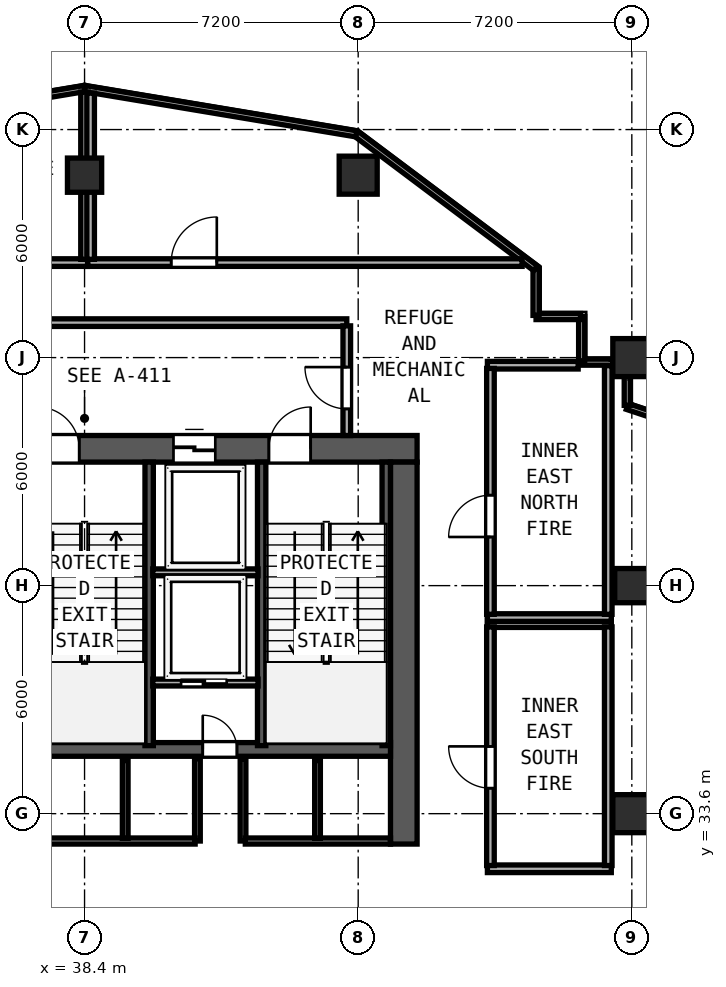
"""IFC4 building model, lengths in metres.
Left out: names, types, materials, properties, quantities, classifications, styles, units other than length and angle.
Written with IfcOpenShell. Run it as: python <this file> out.ifc"""

import sys

from ifc_helpers import new_model, si_unit, direction, frame, frame_2d, origin, origin_2d, place, context, subcontext, project, spatial, rectangle, hollow_rectangle, extrude, element, fill, save


model = new_model("IFC4")
c1 = context("Model", 3, precision=1e-05, world=origin(), true_north=direction((0.0, 1.0)))
c2 = subcontext(c1, "Body", "Model", "MODEL_VIEW")
j1 = project(units=[si_unit("LENGTHUNIT", "METRE"), si_unit("PLANEANGLEUNIT", "RADIAN")], contexts=[c1])
p1 = place(None, origin())
s1 = spatial("IfcSite", under=j1, at=p1, CompositionType="ELEMENT")
p2 = place(p1, origin())
s2 = spatial("IfcBuilding", under=s1, at=p2, CompositionType="ELEMENT")
p3 = place(p2, frame((0.0, 0.0, 136.4)))
s3 = spatial("IfcBuildingStorey", under=s2, at=p3, CompositionType="ELEMENT", Elevation=136.4)
p4 = place(p3, frame((29.65, 43.2, 0.0), z_axis=(0.0, 0.0, 1.0), x_axis=(1.0, 0.0, 0.0)))
e1 = element("IfcWall", 1, at=p4, inside=s3, PredefinedType="SHEAR", context=c2, shape_type="SweptSolid", body=[
    extrude(rectangle(XDim=17.5, YDim=0.7, at=frame_2d((8.75, 0.0))), origin(), (0.0, 0.0, 1.0), 4.4),
])
p5 = place(p4, frame((2.4, 0.0, 0.0)))
e2 = element("IfcOpeningElement", 2, at=p5, cuts=e1, PredefinedType="OPENING", context=c2, shape_type="SweptSolid", body=[
    extrude(rectangle(XDim=1.1, YDim=2.15, at=frame_2d((0.55, 1.075))), frame((0.0, 0.36, 0.0), z_axis=(0.0, -1.0, 0.0), x_axis=(1.0, 0.0, 0.0)), (0.0, 0.0, 1.0), 0.72),
])
p6 = place(p4, frame((7.51, 0.0, 0.0)))
e3 = element("IfcOpeningElement", 3, at=p6, cuts=e1, PredefinedType="OPENING", context=c2, shape_type="SweptSolid", body=[
    extrude(rectangle(XDim=1.1, YDim=2.15, at=frame_2d((0.55, 1.075))), frame((0.0, 0.36, 0.0), z_axis=(0.0, -1.0, 0.0), x_axis=(1.0, 0.0, 0.0)), (0.0, 0.0, 1.0), 0.72),
])
p7 = place(p4, frame((13.6, 0.0, 0.0)))
e4 = element("IfcOpeningElement", 4, at=p7, cuts=e1, PredefinedType="OPENING", context=c2, shape_type="SweptSolid", body=[
    extrude(rectangle(XDim=1.1, YDim=2.15, at=frame_2d((0.55, 1.075))), frame((0.0, 0.36, 0.0), z_axis=(0.0, -1.0, 0.0), x_axis=(1.0, 0.0, 0.0)), (0.0, 0.0, 1.0), 0.72),
])
p8 = place(p4, frame((4.73, 0.0, 0.0)))
e5 = element("IfcOpeningElement", 5, at=p8, cuts=e1, PredefinedType="OPENING", context=c2, shape_type="SweptSolid", body=[
    extrude(rectangle(XDim=1.1, YDim=2.2, at=frame_2d((0.55, 1.1))), frame((0.0, 0.36, 0.0), z_axis=(0.0, -1.0, 0.0), x_axis=(1.0, 0.0, 0.0)), (0.0, 0.0, 1.0), 0.72),
])
p9 = place(p4, frame((11.09, 0.0, 0.0)))
e6 = element("IfcOpeningElement", 6, at=p9, cuts=e1, PredefinedType="OPENING", context=c2, shape_type="SweptSolid", body=[
    extrude(rectangle(XDim=1.1, YDim=2.2, at=frame_2d((0.55, 1.1))), frame((0.0, 0.36, 0.0), z_axis=(0.0, -1.0, 0.0), x_axis=(1.0, 0.0, 0.0)), (0.0, 0.0, 1.0), 0.72),
])
p10 = place(p3, frame((46.8, 32.8, 0.0), z_axis=(0.0, 0.0, 1.0), x_axis=(0.0, 1.0, 0.0)))
e7 = element("IfcWall", 7, at=p10, inside=s3, PredefinedType="SHEAR", context=c2, shape_type="SweptSolid", body=[
    extrude(rectangle(XDim=10.05, YDim=0.7, at=frame_2d((5.025, 0.0))), origin(), (0.0, 0.0, 1.0), 4.4),
])
p11 = place(p3, frame((30.35, 35.29, 0.0), z_axis=(0.0, 0.0, 1.0), x_axis=(1.0, 0.0, 0.0)))
e8 = element("IfcWall", 8, at=p11, inside=s3, PredefinedType="SHEAR", context=c2, shape_type="SweptSolid", body=[
    extrude(rectangle(XDim=16.1, YDim=0.36, at=frame_2d((8.05, 0.0))), origin(), (0.0, 0.0, 1.0), 4.4),
])
p12 = place(p11, frame((5.0, 0.0, 0.0), z_axis=(0.0, 0.0, 1.0), x_axis=(-1.0, 0.0, 0.0)))
e9 = element("IfcOpeningElement", 9, at=p12, cuts=e8, PredefinedType="OPENING", context=c2, shape_type="SweptSolid", body=[
    extrude(rectangle(XDim=0.9, YDim=2.1, at=frame_2d((0.45, 1.05))), frame((0.0, 0.19, 0.0), z_axis=(0.0, -1.0, 0.0), x_axis=(1.0, 0.0, 0.0)), (0.0, 0.0, 1.0), 0.38),
])
p13 = place(p11, frame((12.06, 0.0, 0.0), z_axis=(0.0, 0.0, 1.0), x_axis=(-1.0, 0.0, 0.0)))
e10 = element("IfcOpeningElement", 10, at=p13, cuts=e8, PredefinedType="OPENING", context=c2, shape_type="SweptSolid", body=[
    extrude(rectangle(XDim=0.9, YDim=2.1, at=frame_2d((0.45, 1.05))), frame((0.0, 0.19, 0.0), z_axis=(0.0, -1.0, 0.0), x_axis=(1.0, 0.0, 0.0)), (0.0, 0.0, 1.0), 0.38),
])
for number, where, z_axis, x_axis in (
    (11, (40.1, 35.39, 0.0), (0.0, 0.0, 1.0), (0.0, 1.0, 0.0)),
    (12, (43.06, 35.39, 0.0), (0.0, 0.0, 1.0), (0.0, 1.0, 0.0)),
    (13, (46.338, 35.39, 0.0), (0.0, 0.0, 1.0), (0.0, 1.0, 0.0)),
):
    element("IfcWall", number, at=place(p3, frame(where, z_axis=z_axis, x_axis=x_axis)), inside=s3, PredefinedType="SHEAR", context=c2, shape_type="SweptSolid", body=[
        extrude(rectangle(XDim=7.46, YDim=0.22, at=frame_2d((3.73, 0.0))), origin(), (0.0, 0.0, 1.0), 4.4),
    ])
for number, where, z_axis, x_axis in (
    (14, (52.8, 33.6, 0.0), (0.0, 0.0, 1.0), (1.0, 0.0, 0.0)),
    (15, (52.8, 45.6, 0.0), (0.0, 0.0, 1.0), (1.0, 0.0, 0.0)),
    (16, (45.6, 50.4, 0.0), (0.0, 0.0, 1.0), (1.0, 0.0, 0.0)),
):
    element("IfcColumn", number, at=place(p3, frame(where, z_axis=z_axis, x_axis=x_axis)), inside=s3, PredefinedType="COLUMN", context=c2, shape_type="SweptSolid", body=[
        extrude(hollow_rectangle(XDim=1.0, YDim=1.0, WallThickness=0.038, at=origin_2d()), origin(), (0.0, 0.0, 1.0), 4.6),
    ])
for number, where, z_axis, x_axis in (
    (17, (52.8, 39.6, 0.0), (0.0, 0.0, 1.0), (1.0, 0.0, 0.0)),
    (18, (38.4, 50.4, 0.0), (0.0, 0.0, 1.0), (1.0, 0.0, 0.0)),
):
    element("IfcColumn", number, at=place(p3, frame(where, z_axis=z_axis, x_axis=x_axis)), inside=s3, PredefinedType="COLUMN", context=c2, shape_type="SweptSolid", body=[
        extrude(hollow_rectangle(XDim=0.9, YDim=0.9, WallThickness=0.034, at=origin_2d()), origin(), (0.0, 0.0, 1.0), 4.6),
    ])
p14 = place(p3, frame((58.295, 42.442, 0.0), z_axis=(0.0, 0.0, 1.0), x_axis=(-0.948683298051, 0.316227766017, 0.0)))
e19 = element("IfcWall", 19, at=p14, inside=s3, PredefinedType="PARAPET", context=c2, shape_type="SweptSolid", body=[
    extrude(rectangle(XDim=5.918, YDim=0.16, at=frame_2d((2.959, 0.0))), origin(), (0.0, 0.0, 1.0), 1.15),
])
p15 = place(p3, frame((52.68, 44.344, 0.0), z_axis=(0.0, 0.0, 1.0), x_axis=(0.0, 1.0, 0.0)))
e20 = element("IfcWall", 20, at=p15, inside=s3, PredefinedType="PARAPET", context=c2, shape_type="SweptSolid", body=[
    extrude(rectangle(XDim=0.764, YDim=0.16, at=frame_2d((0.382, 0.0))), origin(), (0.0, 0.0, 1.0), 1.15),
])
p16 = place(p3, frame((52.308, 45.48, 0.0), z_axis=(0.0, 0.0, 1.0), x_axis=(-1.0, 0.0, 0.0)))
e21 = element("IfcWall", 21, at=p16, inside=s3, PredefinedType="PARAPET", context=c2, shape_type="SweptSolid", body=[
    extrude(rectangle(XDim=0.828, YDim=0.16, at=frame_2d((0.414, 0.0))), origin(), (0.0, 0.0, 1.0), 1.15),
])
for number, where, z_axis, x_axis in (
    (22, (51.48, 45.51, 0.0), (0.0, 0.0, 1.0), (0.0, 1.0, 0.0)),
    (23, (51.45, 46.68, 0.0), (0.0, 0.0, 1.0), (-1.0, 0.0, 0.0)),
):
    element("IfcWall", number, at=place(p3, frame(where, z_axis=z_axis, x_axis=x_axis)), inside=s3, PredefinedType="PARAPET", context=c2, shape_type="SweptSolid", body=[
        extrude(rectangle(XDim=1.17, YDim=0.16, at=frame_2d((0.585, 0.0))), origin(), (0.0, 0.0, 1.0), 1.15),
    ])
p17 = place(p3, frame((50.28, 46.71, 0.0), z_axis=(0.0, 0.0, 1.0), x_axis=(0.0, 1.0, 0.0)))
e24 = element("IfcWall", 24, at=p17, inside=s3, PredefinedType="PARAPET", context=c2, shape_type="SweptSolid", body=[
    extrude(rectangle(XDim=1.23, YDim=0.16, at=frame_2d((0.615, 0.0))), origin(), (0.0, 0.0, 1.0), 1.15),
])
p18 = place(p3, frame((50.268, 47.949, 0.0), z_axis=(0.0, 0.0, 1.0), x_axis=(-0.800004969205, 0.599993374337, 0.0)))
e25 = element("IfcWall", 25, at=p18, inside=s3, PredefinedType="PARAPET", context=c2, shape_type="SweptSolid", body=[
    extrude(rectangle(XDim=5.896, YDim=0.16, at=frame_2d((2.948, 0.0))), origin(), (0.0, 0.0, 1.0), 1.15),
])
p19 = place(p3, frame((45.552, 51.486, 0.0), z_axis=(0.0, 0.0, 1.0), x_axis=(-0.986394833909, 0.164393526752, 0.0)))
e26 = element("IfcWall", 26, at=p19, inside=s3, PredefinedType="PARAPET", context=c2, shape_type="SweptSolid", body=[
    extrude(rectangle(XDim=7.25, YDim=0.16, at=frame_2d((3.625, 0.0))), origin(), (0.0, 0.0, 1.0), 1.15),
])
p20 = place(p3, frame((38.4, 52.678, 0.0), z_axis=(0.0, 0.0, 1.0), x_axis=(-0.986393923832, -0.164398987305, 0.0)))
e27 = element("IfcWall", 27, at=p20, inside=s3, PredefinedType="PARAPET", context=c2, shape_type="SweptSolid", body=[
    extrude(rectangle(XDim=7.25, YDim=0.16, at=frame_2d((3.625, 0.0))), origin(), (0.0, 0.0, 1.0), 1.15),
])
p21 = place(p3, frame((31.5, 46.52, 0.0), z_axis=(0.0, 0.0, 1.0), x_axis=(1.0, 0.0, 0.0)))
e28 = element("IfcWall", 28, at=p21, inside=s3, PredefinedType="SOLIDWALL", context=c2, shape_type="SweptSolid", body=[
    extrude(rectangle(XDim=13.8, YDim=0.2, at=frame_2d((6.9, 0.0))), origin(), (0.0, 0.0, 1.0), 4.4),
])
p22 = place(p3, frame((45.3, 43.55, 0.0), z_axis=(0.0, 0.0, 1.0), x_axis=(0.0, 1.0, 0.0)))
e29 = element("IfcWall", 29, at=p22, inside=s3, PredefinedType="SOLIDWALL", context=c2, shape_type="SweptSolid", body=[
    extrude(rectangle(XDim=2.885, YDim=0.2, at=frame_2d((1.442, 0.0))), origin(), (0.0, 0.0, 1.0), 4.4),
])
p23 = place(p22, frame((0.7, 0.0, 0.0)))
e30 = element("IfcOpeningElement", 30, at=p23, cuts=e29, PredefinedType="OPENING", context=c2, shape_type="SweptSolid", body=[
    extrude(rectangle(XDim=1.1, YDim=2.15, at=frame_2d((0.55, 1.075))), frame((0.0, 0.11, 0.0), z_axis=(0.0, -1.0, 0.0), x_axis=(1.0, 0.0, 0.0)), (0.0, 0.0, 1.0), 0.22),
])
p24 = place(p3, frame((40.195, 39.95, 0.0), z_axis=(0.0, 0.0, 1.0), x_axis=(1.0, 0.0, 0.0)))
e31 = element("IfcWall", 31, at=p24, inside=s3, PredefinedType="SOLIDWALL", context=c2, shape_type="SweptSolid", body=[
    extrude(rectangle(XDim=2.77, YDim=0.18, at=frame_2d((1.385, 0.0))), origin(), (0.0, 0.0, 1.0), 4.4),
])
p25 = place(p3, frame((40.195, 37.05, 0.0), z_axis=(0.0, 0.0, 1.0), x_axis=(1.0, 0.0, 0.0)))
e32 = element("IfcWall", 32, at=p25, inside=s3, PredefinedType="SOLIDWALL", context=c2, shape_type="SweptSolid", body=[
    extrude(rectangle(XDim=2.77, YDim=0.18, at=frame_2d((1.385, 0.0))), origin(), (0.0, 0.0, 1.0), 4.4),
])
p26 = place(p25, frame((1.945, 0.0, 0.0), z_axis=(0.0, 0.0, 1.0), x_axis=(-1.0, 0.0, 0.0)))
e33 = element("IfcOpeningElement", 33, at=p26, cuts=e32, PredefinedType="OPENING", context=c2, shape_type="SweptSolid", body=[
    extrude(rectangle(XDim=1.2, YDim=2.2, at=frame_2d((0.6, 1.1))), frame((0.0, 0.1, 0.0), z_axis=(0.0, -1.0, 0.0), x_axis=(1.0, 0.0, 0.0)), (0.0, 0.0, 1.0), 0.2),
])
for number, where, z_axis, x_axis in (
    (34, (41.37, 32.88, 0.0), (0.0, 0.0, 1.0), (0.0, 1.0, 0.0)),
    (35, (42.57, 32.88, 0.0), (0.0, 0.0, 1.0), (0.0, 1.0, 0.0)),
):
    element("IfcWall", number, at=place(p3, frame(where, z_axis=z_axis, x_axis=x_axis)), inside=s3, PredefinedType="SOLIDWALL", context=c2, shape_type="SweptSolid", body=[
        extrude(rectangle(XDim=2.17, YDim=0.15, at=frame_2d((1.085, 0.0))), origin(), (0.0, 0.0, 1.0), 4.4),
    ])
p27 = place(p3, frame((35.57, 32.88, 0.0), z_axis=(0.0, 0.0, 1.0), x_axis=(1.0, 0.0, 0.0)))
e36 = element("IfcWall", 36, at=p27, inside=s3, PredefinedType="SOLIDWALL", context=c2, shape_type="SweptSolid", body=[
    extrude(rectangle(XDim=5.74, YDim=0.16, at=frame_2d((2.87, 0.0))), origin(), (0.0, 0.0, 1.0), 4.4),
])
p28 = place(p27, frame((1.49, 0.0, 0.0), z_axis=(0.0, 0.0, 1.0), x_axis=(-1.0, 0.0, 0.0)))
e37 = element("IfcOpeningElement", 37, at=p28, cuts=e36, PredefinedType="OPENING", context=c2, shape_type="SweptSolid", body=[
    extrude(rectangle(XDim=0.95, YDim=2.12, at=frame_2d((0.475, 1.06))), frame((0.0, 0.09, 0.0), z_axis=(0.0, -1.0, 0.0), x_axis=(1.0, 0.0, 0.0)), (0.0, 0.0, 1.0), 0.18),
])
p29 = place(p3, frame((42.63, 32.88, 0.0), z_axis=(0.0, 0.0, 1.0), x_axis=(1.0, 0.0, 0.0)))
e38 = element("IfcWall", 38, at=p29, inside=s3, PredefinedType="SOLIDWALL", context=c2, shape_type="SweptSolid", body=[
    extrude(rectangle(XDim=3.82, YDim=0.16, at=frame_2d((1.91, 0.0))), origin(), (0.0, 0.0, 1.0), 4.4),
])
for number, where, z_axis, x_axis in (
    (39, (39.47, 32.95, 0.0), (0.0, 0.0, 1.0), (0.0, 1.0, 0.0)),
    (40, (44.53, 32.95, 0.0), (0.0, 0.0, 1.0), (0.0, 1.0, 0.0)),
):
    element("IfcWall", number, at=place(p3, frame(where, z_axis=z_axis, x_axis=x_axis)), inside=s3, PredefinedType="SOLIDWALL", context=c2, shape_type="SweptSolid", body=[
        extrude(rectangle(XDim=2.05, YDim=0.15, at=frame_2d((1.025, 0.0))), origin(), (0.0, 0.0, 1.0), 4.4),
    ])
for number, where, z_axis, x_axis in (
    (41, (49.0, 38.6, 0.0), (0.0, 0.0, 1.0), (1.0, 0.0, 0.0)),
    (42, (49.0, 32.15, 0.0), (0.0, 0.0, 1.0), (1.0, 0.0, 0.0)),
):
    element("IfcWall", number, at=place(p3, frame(where, z_axis=z_axis, x_axis=x_axis)), inside=s3, PredefinedType="SOLIDWALL", context=c2, shape_type="SweptSolid", body=[
        extrude(rectangle(XDim=3.26, YDim=0.2, at=frame_2d((1.63, 0.0))), origin(), (0.0, 0.0, 1.0), 4.4),
    ])
p30 = place(p3, frame((49.08, 32.235, 0.0), z_axis=(0.0, 0.0, 1.0), x_axis=(0.0, 1.0, 0.0)))
e43 = element("IfcWall", 43, at=p30, inside=s3, PredefinedType="SOLIDWALL", context=c2, shape_type="SweptSolid", body=[
    extrude(rectangle(XDim=6.28, YDim=0.2, at=frame_2d((3.14, 0.0))), origin(), (0.0, 0.0, 1.0), 4.4),
])
p31 = place(p30, frame((2.035, 0.0, 0.0)))
e44 = element("IfcOpeningElement", 44, at=p31, cuts=e43, PredefinedType="OPENING", context=c2, shape_type="SweptSolid", body=[
    extrude(rectangle(XDim=1.1, YDim=2.15, at=frame_2d((0.55, 1.075))), frame((0.0, 0.11, 0.0), z_axis=(0.0, -1.0, 0.0), x_axis=(1.0, 0.0, 0.0)), (0.0, 0.0, 1.0), 0.22),
])
p32 = place(p3, frame((52.18, 32.235, 0.0), z_axis=(0.0, 0.0, 1.0), x_axis=(0.0, 1.0, 0.0)))
e45 = element("IfcWall", 45, at=p32, inside=s3, PredefinedType="SOLIDWALL", context=c2, shape_type="SweptSolid", body=[
    extrude(rectangle(XDim=6.28, YDim=0.2, at=frame_2d((3.14, 0.0))), origin(), (0.0, 0.0, 1.0), 4.4),
])
p33 = place(p3, frame((49.0, 45.4, 0.0), z_axis=(0.0, 0.0, 1.0), x_axis=(1.0, 0.0, 0.0)))
e46 = element("IfcWall", 46, at=p33, inside=s3, PredefinedType="SOLIDWALL", context=c2, shape_type="SweptSolid", body=[
    extrude(rectangle(XDim=2.388, YDim=0.2, at=frame_2d((1.194, 0.0))), origin(), (0.0, 0.0, 1.0), 4.4),
])
p34 = place(p3, frame((49.0, 38.76, 0.0), z_axis=(0.0, 0.0, 1.0), x_axis=(1.0, 0.0, 0.0)))
e47 = element("IfcWall", 47, at=p34, inside=s3, PredefinedType="SOLIDWALL", context=c2, shape_type="SweptSolid", body=[
    extrude(rectangle(XDim=3.26, YDim=0.2, at=frame_2d((1.63, 0.0))), origin(), (0.0, 0.0, 1.0), 4.4),
])
p35 = place(p3, frame((49.08, 38.845, 0.0), z_axis=(0.0, 0.0, 1.0), x_axis=(0.0, 1.0, 0.0)))
e48 = element("IfcWall", 48, at=p35, inside=s3, PredefinedType="SOLIDWALL", context=c2, shape_type="SweptSolid", body=[
    extrude(rectangle(XDim=6.47, YDim=0.2, at=frame_2d((3.235, 0.0))), origin(), (0.0, 0.0, 1.0), 4.4),
])
p36 = place(p35, frame((2.035, 0.0, 0.0)))
e49 = element("IfcOpeningElement", 49, at=p36, cuts=e48, PredefinedType="OPENING", context=c2, shape_type="SweptSolid", body=[
    extrude(rectangle(XDim=1.1, YDim=2.15, at=frame_2d((0.55, 1.075))), frame((0.0, 0.11, 0.0), z_axis=(0.0, -1.0, 0.0), x_axis=(1.0, 0.0, 0.0)), (0.0, 0.0, 1.0), 0.22),
])
p37 = place(p3, frame((52.18, 38.845, 0.0), z_axis=(0.0, 0.0, 1.0), x_axis=(0.0, 1.0, 0.0)))
e50 = element("IfcWall", 50, at=p37, inside=s3, PredefinedType="SOLIDWALL", context=c2, shape_type="SweptSolid", body=[
    extrude(rectangle(XDim=6.543, YDim=0.2, at=frame_2d((3.271, 0.0))), origin(), (0.0, 0.0, 1.0), 4.4),
])
p38 = place(p3, frame((26.887, 48.1, 0.0), z_axis=(0.0, 0.0, 1.0), x_axis=(1.0, 0.0, 0.0)))
e51 = element("IfcWall", 51, at=p38, inside=s3, PredefinedType="SOLIDWALL", context=c2, shape_type="SweptSolid", body=[
    extrude(rectangle(XDim=11.593, YDim=0.2, at=frame_2d((5.797, 0.0))), origin(), (0.0, 0.0, 1.0), 4.4),
])
p39 = place(p38, frame((4.063, 0.0, 0.0)))
e52 = element("IfcOpeningElement", 52, at=p39, cuts=e51, PredefinedType="OPENING", context=c2, shape_type="SweptSolid", body=[
    extrude(rectangle(XDim=1.2, YDim=2.15, at=frame_2d((0.6, 1.075))), frame((0.0, 0.11, 0.0), z_axis=(0.0, -1.0, 0.0), x_axis=(1.0, 0.0, 0.0)), (0.0, 0.0, 1.0), 0.22),
])
p40 = place(p3, frame((38.4, 48.185, 0.0), z_axis=(0.0, 0.0, 1.0), x_axis=(0.0, 1.0, 0.0)))
e53 = element("IfcWall", 53, at=p40, inside=s3, PredefinedType="SOLIDWALL", context=c2, shape_type="SweptSolid", body=[
    extrude(rectangle(XDim=4.4, YDim=0.2, at=frame_2d((2.2, 0.0))), origin(), (0.0, 0.0, 1.0), 4.4),
])
p41 = place(p3, frame((38.485, 48.1, 0.0), z_axis=(0.0, 0.0, 1.0), x_axis=(1.0, 0.0, 0.0)))
e54 = element("IfcWall", 54, at=p41, inside=s3, PredefinedType="SOLIDWALL", context=c2, shape_type="SweptSolid", body=[
    extrude(rectangle(XDim=11.428, YDim=0.2, at=frame_2d((5.714, 0.0))), origin(), (0.0, 0.0, 1.0), 4.4),
])
p42 = place(p41, frame((2.195, 0.0, 0.0)))
e55 = element("IfcOpeningElement", 55, at=p42, cuts=e54, PredefinedType="OPENING", context=c2, shape_type="SweptSolid", body=[
    extrude(rectangle(XDim=1.2, YDim=2.15, at=frame_2d((0.6, 1.075))), frame((0.0, 0.11, 0.0), z_axis=(0.0, -1.0, 0.0), x_axis=(1.0, 0.0, 0.0)), (0.0, 0.0, 1.0), 0.22),
])
p43 = place(p3, frame((38.56, 48.185, 0.0), z_axis=(0.0, 0.0, 1.0), x_axis=(0.0, 1.0, 0.0)))
e56 = element("IfcWall", 56, at=p43, inside=s3, PredefinedType="SOLIDWALL", context=c2, shape_type="SweptSolid", body=[
    extrude(rectangle(XDim=4.373, YDim=0.2, at=frame_2d((2.187, 0.0))), origin(), (0.0, 0.0, 1.0), 4.4),
])
p44 = place(p6, origin())
e57 = element("IfcDoor", 57, at=p44, inside=s3, OperationType="SINGLE_SWING_LEFT", PredefinedType="DOOR", context=c2, shape_type="SweptSolid", body=[
    extrude(rectangle(XDim=1.1, YDim=2.15, at=frame_2d((0.55, 1.075))), frame((0.0, 0.185, 0.0), z_axis=(0.0, -1.0, 0.0), x_axis=(1.0, 0.0, 0.0)), (0.0, 0.0, 1.0), 0.05),
])
fill(e3, e57)
p45 = place(p7, origin())
e58 = element("IfcDoor", 58, at=p45, inside=s3, OperationType="SINGLE_SWING_RIGHT", PredefinedType="DOOR", context=c2, shape_type="SweptSolid", body=[
    extrude(rectangle(XDim=1.1, YDim=2.15, at=frame_2d((0.55, 1.075))), frame((0.0, 0.185, 0.0), z_axis=(0.0, -1.0, 0.0), x_axis=(1.0, 0.0, 0.0)), (0.0, 0.0, 1.0), 0.05),
])
fill(e4, e58)
p46 = place(p23, origin())
e59 = element("IfcDoor", 59, at=p46, inside=s3, OperationType="SINGLE_SWING_RIGHT", PredefinedType="DOOR", context=c2, shape_type="SweptSolid", body=[
    extrude(rectangle(XDim=1.1, YDim=2.15, at=frame_2d((0.55, 1.075))), frame((0.0, 0.025, 0.0), z_axis=(0.0, -1.0, 0.0), x_axis=(1.0, 0.0, 0.0)), (0.0, 0.0, 1.0), 0.05),
])
fill(e30, e59)
p47 = place(p9, origin())
e60 = element("IfcDoor", 60, at=p47, inside=s3, OperationType="SLIDING_TO_LEFT", PredefinedType="DOOR", context=c2, shape_type="SweptSolid", body=[
    extrude(rectangle(XDim=1.1, YDim=2.2, at=frame_2d((0.55, 1.1))), frame((0.0, 0.185, 0.0), z_axis=(0.0, -1.0, 0.0), x_axis=(1.0, 0.0, 0.0)), (0.0, 0.0, 1.0), 0.05),
])
fill(e6, e60)
p48 = place(p26, origin())
e61 = element("IfcDoor", 61, at=p48, inside=s3, OperationType="SLIDING_TO_RIGHT", PredefinedType="DOOR", context=c2, shape_type="SweptSolid", body=[
    extrude(rectangle(XDim=1.2, YDim=2.2, at=frame_2d((0.6, 1.1))), frame((0.0, 0.025, 0.0), z_axis=(0.0, -1.0, 0.0), x_axis=(1.0, 0.0, 0.0)), (0.0, 0.0, 1.0), 0.05),
])
fill(e33, e61)
p49 = place(p13, origin())
e62 = element("IfcDoor", 62, at=p49, inside=s3, OperationType="SINGLE_SWING_RIGHT", PredefinedType="DOOR", context=c2, shape_type="SweptSolid", body=[
    extrude(rectangle(XDim=0.9, YDim=2.1, at=frame_2d((0.45, 1.05))), frame((0.0, 0.025, 0.0), z_axis=(0.0, -1.0, 0.0), x_axis=(1.0, 0.0, 0.0)), (0.0, 0.0, 1.0), 0.05),
])
fill(e10, e62)
p50 = place(p31, origin())
e63 = element("IfcDoor", 63, at=p50, inside=s3, OperationType="SINGLE_SWING_RIGHT", PredefinedType="DOOR", context=c2, shape_type="SweptSolid", body=[
    extrude(rectangle(XDim=1.1, YDim=2.15, at=frame_2d((0.55, 1.075))), frame((0.0, 0.025, 0.0), z_axis=(0.0, -1.0, 0.0), x_axis=(1.0, 0.0, 0.0)), (0.0, 0.0, 1.0), 0.05),
])
fill(e44, e63)
p51 = place(p36, origin())
e64 = element("IfcDoor", 64, at=p51, inside=s3, OperationType="SINGLE_SWING_LEFT", PredefinedType="DOOR", context=c2, shape_type="SweptSolid", body=[
    extrude(rectangle(XDim=1.1, YDim=2.15, at=frame_2d((0.55, 1.075))), frame((0.0, 0.025, 0.0), z_axis=(0.0, -1.0, 0.0), x_axis=(1.0, 0.0, 0.0)), (0.0, 0.0, 1.0), 0.05),
])
fill(e49, e64)
p52 = place(p42, origin())
e65 = element("IfcDoor", 65, at=p52, inside=s3, OperationType="SINGLE_SWING_RIGHT", PredefinedType="DOOR", context=c2, shape_type="SweptSolid", body=[
    extrude(rectangle(XDim=1.2, YDim=2.15, at=frame_2d((0.6, 1.075))), frame((0.0, 0.025, 0.0), z_axis=(0.0, -1.0, 0.0), x_axis=(1.0, 0.0, 0.0)), (0.0, 0.0, 1.0), 0.05),
])
fill(e55, e65)
save(model, sys.argv[1])
